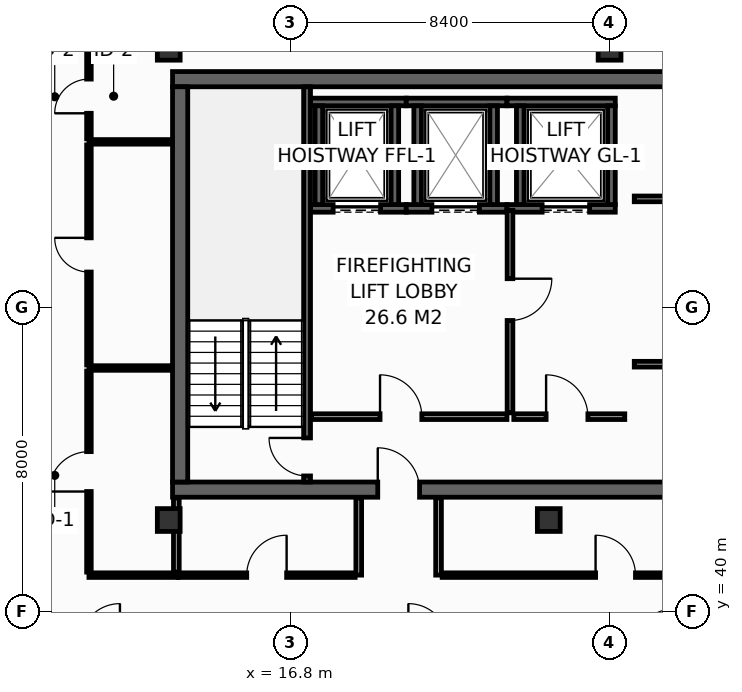
"""IFC4 building model, lengths in metres.
Left out: names, types, materials, properties, quantities, classifications, styles, units other than length and angle.
Written with IfcOpenShell. Run it as: python <this file> out.ifc"""

import sys

from ifc_helpers import new_model, si_unit, direction, frame, frame_2d, origin, origin_2d, place, context, subcontext, project, spatial, rectangle, hollow_rectangle, extrude, element, fill, save


model = new_model("IFC4")
c1 = context("Model", 3, precision=1e-05, world=origin(), true_north=direction((0.0, 1.0)))
c2 = subcontext(c1, "Body", "Model", "MODEL_VIEW")
j1 = project(units=[si_unit("LENGTHUNIT", "METRE"), si_unit("PLANEANGLEUNIT", "RADIAN")], contexts=[c1])
p1 = place(None, origin())
s1 = spatial("IfcSite", under=j1, at=p1, CompositionType="ELEMENT")
p2 = place(p1, origin())
s2 = spatial("IfcBuilding", under=s1, at=p2, CompositionType="ELEMENT")
p3 = place(p2, frame((0.0, 0.0, 276.2)))
s3 = spatial("IfcBuildingStorey", under=s2, at=p3, CompositionType="ELEMENT", Elevation=276.2)
p4 = place(p3, frame((13.7, 43.2, 0.0), z_axis=(0.0, 0.0, 1.0), x_axis=(1.0, 0.0, 0.0)))
e1 = element("IfcWall", 1, at=p4, inside=s3, PredefinedType="SHEAR", context=c2, shape_type="SweptSolid", body=[
    extrude(rectangle(XDim=32.5, YDim=0.4, at=frame_2d((16.25, 0.0))), origin(), (0.0, 0.0, 1.0), 3.55),
])
p5 = place(p4, frame((5.4, 0.0, 0.0)))
e2 = element("IfcOpeningElement", 2, at=p5, cuts=e1, PredefinedType="OPENING", context=c2, shape_type="SweptSolid", body=[
    extrude(rectangle(XDim=1.1, YDim=2.15, at=frame_2d((0.55, 1.075))), frame((0.0, 0.21, 0.0), z_axis=(0.0, -1.0, 0.0), x_axis=(1.0, 0.0, 0.0)), (0.0, 0.0, 1.0), 0.42),
])
p6 = place(p4, frame((25.6, 0.0, 0.0)))
e3 = element("IfcOpeningElement", 3, at=p6, cuts=e1, PredefinedType="OPENING", context=c2, shape_type="SweptSolid", body=[
    extrude(rectangle(XDim=1.1, YDim=2.15, at=frame_2d((0.55, 1.075))), frame((0.0, 0.21, 0.0), z_axis=(0.0, -1.0, 0.0), x_axis=(1.0, 0.0, 0.0)), (0.0, 0.0, 1.0), 0.42),
])
p7 = place(p3, frame((13.7, 54.0, 0.0), z_axis=(0.0, 0.0, 1.0), x_axis=(1.0, 0.0, 0.0)))
e4 = element("IfcWall", 4, at=p7, inside=s3, PredefinedType="SHEAR", context=c2, shape_type="SweptSolid", body=[
    extrude(rectangle(XDim=32.5, YDim=0.4, at=frame_2d((16.25, 0.0))), origin(), (0.0, 0.0, 1.0), 3.55),
])
p8 = place(p3, frame((13.9, 43.4, 0.0), z_axis=(0.0, 0.0, 1.0), x_axis=(0.0, 1.0, 0.0)))
e5 = element("IfcWall", 5, at=p8, inside=s3, PredefinedType="SHEAR", context=c2, shape_type="SweptSolid", body=[
    extrude(rectangle(XDim=10.4, YDim=0.4, at=frame_2d((5.2, 0.0))), origin(), (0.0, 0.0, 1.0), 3.55),
])
for number, where, z_axis, x_axis in (
    (6, (13.6, 54.8, 0.0), (0.0, 0.0, 1.0), (1.0, 0.0, 0.0)),
    (7, (25.2, 54.8, 0.0), (0.0, 0.0, 1.0), (1.0, 0.0, 0.0)),
    (8, (13.6, 42.4, 0.0), (0.0, 0.0, 1.0), (1.0, 0.0, 0.0)),
    (9, (23.6, 42.4, 0.0), (0.0, 0.0, 1.0), (1.0, 0.0, 0.0)),
):
    element("IfcColumn", number, at=place(p3, frame(where, z_axis=z_axis, x_axis=x_axis)), inside=s3, PredefinedType="COLUMN", context=c2, shape_type="SweptSolid", body=[
        extrude(hollow_rectangle(XDim=0.6, YDim=0.6, WallThickness=0.028, at=origin_2d()), origin(), (0.0, 0.0, 1.0), 3.8),
    ])
p9 = place(p3, frame((17.33, 50.6, 0.0), z_axis=(0.0, 0.0, 1.0), x_axis=(1.0, 0.0, 0.0)))
e10 = element("IfcWall", 10, at=p9, inside=s3, PredefinedType="SHEAR", context=c2, shape_type="SweptSolid", body=[
    extrude(rectangle(XDim=2.52, YDim=0.2, at=frame_2d((1.26, 0.0))), origin(), (0.0, 0.0, 1.0), 3.55),
])
p10 = place(p9, frame((0.595, 0.0, 0.0)))
e11 = element("IfcOpeningElement", 11, at=p10, cuts=e10, PredefinedType="OPENING", context=c2, shape_type="SweptSolid", body=[
    extrude(rectangle(XDim=1.25, YDim=2.3, at=frame_2d((0.625, 1.15))), frame((0.0, 0.11, 0.0), z_axis=(0.0, -1.0, 0.0), x_axis=(1.0, 0.0, 0.0)), (0.0, 0.0, 1.0), 0.22),
])
p11 = place(p3, frame((17.33, 53.4, 0.0), z_axis=(0.0, 0.0, 1.0), x_axis=(1.0, 0.0, 0.0)))
e12 = element("IfcWall", 12, at=p11, inside=s3, PredefinedType="SHEAR", context=c2, shape_type="SweptSolid", body=[
    extrude(rectangle(XDim=2.52, YDim=0.2, at=frame_2d((1.26, 0.0))), origin(), (0.0, 0.0, 1.0), 3.55),
])
for number, where, z_axis, x_axis in (
    (13, (17.55, 50.7, 0.0), (0.0, 0.0, 1.0), (0.0, 1.0, 0.0)),
    (14, (19.55, 50.7, 0.0), (0.0, 0.0, 1.0), (0.0, 1.0, 0.0)),
):
    element("IfcWall", number, at=place(p3, frame(where, z_axis=z_axis, x_axis=x_axis)), inside=s3, PredefinedType="SHEAR", context=c2, shape_type="SweptSolid", body=[
        extrude(rectangle(XDim=2.6, YDim=0.2, at=frame_2d((1.3, 0.0))), origin(), (0.0, 0.0, 1.0), 3.55),
    ])
p12 = place(p3, frame((19.85, 50.6, 0.0), z_axis=(0.0, 0.0, 1.0), x_axis=(1.0, 0.0, 0.0)))
e15 = element("IfcWall", 15, at=p12, inside=s3, PredefinedType="SHEAR", context=c2, shape_type="SweptSolid", body=[
    extrude(rectangle(XDim=2.65, YDim=0.2, at=frame_2d((1.325, 0.0))), origin(), (0.0, 0.0, 1.0), 3.55),
])
p13 = place(p12, frame((0.675, 0.0, 0.0)))
e16 = element("IfcOpeningElement", 16, at=p13, cuts=e15, PredefinedType="OPENING", context=c2, shape_type="SweptSolid", body=[
    extrude(rectangle(XDim=1.25, YDim=2.3, at=frame_2d((0.625, 1.15))), frame((0.0, 0.11, 0.0), z_axis=(0.0, -1.0, 0.0), x_axis=(1.0, 0.0, 0.0)), (0.0, 0.0, 1.0), 0.22),
])
p14 = place(p3, frame((19.85, 53.4, 0.0), z_axis=(0.0, 0.0, 1.0), x_axis=(1.0, 0.0, 0.0)))
e17 = element("IfcWall", 17, at=p14, inside=s3, PredefinedType="SHEAR", context=c2, shape_type="SweptSolid", body=[
    extrude(rectangle(XDim=2.65, YDim=0.2, at=frame_2d((1.325, 0.0))), origin(), (0.0, 0.0, 1.0), 3.55),
])
for number, where, z_axis, x_axis in (
    (18, (20.15, 50.7, 0.0), (0.0, 0.0, 1.0), (0.0, 1.0, 0.0)),
    (19, (22.15, 50.7, 0.0), (0.0, 0.0, 1.0), (0.0, 1.0, 0.0)),
):
    element("IfcWall", number, at=place(p3, frame(where, z_axis=z_axis, x_axis=x_axis)), inside=s3, PredefinedType="SHEAR", context=c2, shape_type="SweptSolid", body=[
        extrude(rectangle(XDim=2.6, YDim=0.2, at=frame_2d((1.3, 0.0))), origin(), (0.0, 0.0, 1.0), 3.55),
    ])
p15 = place(p3, frame((22.5, 50.6, 0.0), z_axis=(0.0, 0.0, 1.0), x_axis=(1.0, 0.0, 0.0)))
e20 = element("IfcWall", 20, at=p15, inside=s3, PredefinedType="SHEAR", context=c2, shape_type="SweptSolid", body=[
    extrude(rectangle(XDim=2.85, YDim=0.2, at=frame_2d((1.425, 0.0))), origin(), (0.0, 0.0, 1.0), 3.55),
])
p16 = place(p15, frame((0.925, 0.0, 0.0)))
e21 = element("IfcOpeningElement", 21, at=p16, cuts=e20, PredefinedType="OPENING", context=c2, shape_type="SweptSolid", body=[
    extrude(rectangle(XDim=1.25, YDim=2.3, at=frame_2d((0.625, 1.15))), frame((0.0, 0.11, 0.0), z_axis=(0.0, -1.0, 0.0), x_axis=(1.0, 0.0, 0.0)), (0.0, 0.0, 1.0), 0.22),
])
p17 = place(p3, frame((22.5, 53.4, 0.0), z_axis=(0.0, 0.0, 1.0), x_axis=(1.0, 0.0, 0.0)))
e22 = element("IfcWall", 22, at=p17, inside=s3, PredefinedType="SHEAR", context=c2, shape_type="SweptSolid", body=[
    extrude(rectangle(XDim=2.85, YDim=0.2, at=frame_2d((1.425, 0.0))), origin(), (0.0, 0.0, 1.0), 3.55),
])
for number, where, z_axis, x_axis in (
    (23, (22.85, 50.7, 0.0), (0.0, 0.0, 1.0), (0.0, 1.0, 0.0)),
    (24, (25.25, 50.7, 0.0), (0.0, 0.0, 1.0), (0.0, 1.0, 0.0)),
):
    element("IfcWall", number, at=place(p3, frame(where, z_axis=z_axis, x_axis=x_axis)), inside=s3, PredefinedType="SHEAR", context=c2, shape_type="SweptSolid", body=[
        extrude(rectangle(XDim=2.6, YDim=0.2, at=frame_2d((1.3, 0.0))), origin(), (0.0, 0.0, 1.0), 3.55),
    ])
p18 = place(p3, frame((17.24, 43.4, 0.0), z_axis=(0.0, 0.0, 1.0), x_axis=(0.0, 1.0, 0.0)))
e25 = element("IfcWall", 25, at=p18, inside=s3, PredefinedType="SHEAR", context=c2, shape_type="SweptSolid", body=[
    extrude(rectangle(XDim=10.4, YDim=0.18, at=frame_2d((5.2, 0.0))), origin(), (0.0, 0.0, 1.0), 3.55),
])
p19 = place(p18, frame((0.16, 0.0, 0.0)))
e26 = element("IfcOpeningElement", 26, at=p19, cuts=e25, PredefinedType="OPENING", context=c2, shape_type="SweptSolid", body=[
    extrude(rectangle(XDim=1.0, YDim=2.15, at=frame_2d((0.5, 1.075))), frame((0.0, 0.1, 0.0), z_axis=(0.0, -1.0, 0.0), x_axis=(1.0, 0.0, 0.0)), (0.0, 0.0, 1.0), 0.2),
])
p20 = place(p3, frame((17.36, 45.12, 0.0), z_axis=(0.0, 0.0, 1.0), x_axis=(1.0, 0.0, 0.0)))
e27 = element("IfcWall", 27, at=p20, inside=s3, PredefinedType="PARTITIONING", context=c2, shape_type="SweptSolid", body=[
    extrude(rectangle(XDim=5.14, YDim=0.15, at=frame_2d((2.57, 0.0))), origin(), (0.0, 0.0, 1.0), 3.55),
])
p21 = place(p20, frame((1.8, 0.0, 0.0)))
e28 = element("IfcOpeningElement", 28, at=p21, cuts=e27, PredefinedType="OPENING", context=c2, shape_type="SweptSolid", body=[
    extrude(rectangle(XDim=1.1, YDim=2.15, at=frame_2d((0.55, 1.075))), frame((0.0, 0.085, 0.0), z_axis=(0.0, -1.0, 0.0), x_axis=(1.0, 0.0, 0.0)), (0.0, 0.0, 1.0), 0.17),
])
p22 = place(p3, frame((22.58, 50.55, 0.0), z_axis=(0.0, 0.0, 1.0), x_axis=(0.0, -1.0, 0.0)))
e29 = element("IfcWall", 29, at=p22, inside=s3, PredefinedType="PARTITIONING", context=c2, shape_type="SweptSolid", body=[
    extrude(rectangle(XDim=5.33, YDim=0.15, at=frame_2d((2.665, 0.0))), origin(), (0.0, 0.0, 1.0), 3.55),
])
p23 = place(p22, frame((1.8, 0.0, 0.0)))
e30 = element("IfcOpeningElement", 30, at=p23, cuts=e29, PredefinedType="OPENING", context=c2, shape_type="SweptSolid", body=[
    extrude(rectangle(XDim=1.1, YDim=2.15, at=frame_2d((0.55, 1.075))), frame((0.0, 0.085, 0.0), z_axis=(0.0, -1.0, 0.0), x_axis=(1.0, 0.0, 0.0)), (0.0, 0.0, 1.0), 0.17),
])
p24 = place(p3, frame((22.68, 45.12, 0.0), z_axis=(0.0, 0.0, 1.0), x_axis=(1.0, 0.0, 0.0)))
e31 = element("IfcWall", 31, at=p24, inside=s3, PredefinedType="PARTITIONING", context=c2, shape_type="SweptSolid", body=[
    extrude(rectangle(XDim=2.92, YDim=0.15, at=frame_2d((1.46, 0.0))), origin(), (0.0, 0.0, 1.0), 3.55),
])
p25 = place(p24, frame((0.85, 0.0, 0.0)))
e32 = element("IfcOpeningElement", 32, at=p25, cuts=e31, PredefinedType="OPENING", context=c2, shape_type="SweptSolid", body=[
    extrude(rectangle(XDim=1.1, YDim=2.15, at=frame_2d((0.55, 1.075))), frame((0.0, 0.085, 0.0), z_axis=(0.0, -1.0, 0.0), x_axis=(1.0, 0.0, 0.0)), (0.0, 0.0, 1.0), 0.17),
])
p26 = place(p3, frame((25.85, 50.85, 0.0), z_axis=(0.0, 0.0, 1.0), x_axis=(1.0, 0.0, 0.0)))
e33 = element("IfcWall", 33, at=p26, inside=s3, PredefinedType="PARTITIONING", context=c2, shape_type="SweptSolid", body=[
    extrude(rectangle(XDim=7.65, YDim=0.15, at=frame_2d((3.825, 0.0))), origin(), (0.0, 0.0, 1.0), 3.55),
])
p27 = place(p26, frame((1.25, 0.0, 0.0)))
e34 = element("IfcOpeningElement", 34, at=p27, cuts=e33, PredefinedType="OPENING", context=c2, shape_type="SweptSolid", body=[
    extrude(rectangle(XDim=0.95, YDim=2.15, at=frame_2d((0.475, 1.075))), frame((0.0, 0.085, 0.0), z_axis=(0.0, -1.0, 0.0), x_axis=(1.0, 0.0, 0.0)), (0.0, 0.0, 1.0), 0.17),
])
p28 = place(p26, frame((5.05, 0.0, 0.0)))
e35 = element("IfcOpeningElement", 35, at=p28, cuts=e33, PredefinedType="OPENING", context=c2, shape_type="SweptSolid", body=[
    extrude(rectangle(XDim=0.95, YDim=2.15, at=frame_2d((0.475, 1.075))), frame((0.0, 0.085, 0.0), z_axis=(0.0, -1.0, 0.0), x_axis=(1.0, 0.0, 0.0)), (0.0, 0.0, 1.0), 0.17),
])
p29 = place(p3, frame((25.85, 46.5, 0.0), z_axis=(0.0, 0.0, 1.0), x_axis=(1.0, 0.0, 0.0)))
e36 = element("IfcWall", 36, at=p29, inside=s3, PredefinedType="PARTITIONING", context=c2, shape_type="SweptSolid", body=[
    extrude(rectangle(XDim=7.65, YDim=0.15, at=frame_2d((3.825, 0.0))), origin(), (0.0, 0.0, 1.0), 3.55),
])
p30 = place(p29, frame((2.8, 0.0, 0.0)))
e37 = element("IfcOpeningElement", 37, at=p30, cuts=e36, PredefinedType="OPENING", context=c2, shape_type="SweptSolid", body=[
    extrude(rectangle(XDim=0.95, YDim=2.15, at=frame_2d((0.475, 1.075))), frame((0.0, 0.085, 0.0), z_axis=(0.0, -1.0, 0.0), x_axis=(1.0, 0.0, 0.0)), (0.0, 0.0, 1.0), 0.17),
])
p31 = place(p3, frame((11.5, 40.95, 0.0), z_axis=(0.0, 0.0, 1.0), x_axis=(1.0, 0.0, 0.0)))
e38 = element("IfcWall", 38, at=p31, inside=s3, PredefinedType="PARTITIONING", context=c2, shape_type="SweptSolid", body=[
    extrude(rectangle(XDim=2.35, YDim=0.12, at=frame_2d((1.175, 0.0))), origin(), (0.0, 0.0, 1.0), 3.55),
])
p32 = place(p3, frame((11.5, 52.35, 0.0), z_axis=(0.0, 0.0, 1.0), x_axis=(1.0, 0.0, 0.0)))
e39 = element("IfcWall", 39, at=p32, inside=s3, PredefinedType="PARTITIONING", context=c2, shape_type="SweptSolid", body=[
    extrude(rectangle(XDim=2.18, YDim=0.12, at=frame_2d((1.09, 0.0))), origin(), (0.0, 0.0, 1.0), 3.55),
])
p33 = place(p3, frame((11.5, 52.43, 0.0), z_axis=(0.0, 0.0, 1.0), x_axis=(0.0, 1.0, 0.0)))
e40 = element("IfcWall", 40, at=p33, inside=s3, PredefinedType="PARTITIONING", context=c2, shape_type="SweptSolid", body=[
    extrude(rectangle(XDim=3.565, YDim=0.12, at=frame_2d((1.783, 0.0))), origin(), (0.0, 0.0, 1.0), 2.935),
])
p34 = place(p33, frame((0.672, 0.0, 0.0)))
e41 = element("IfcOpeningElement", 41, at=p34, cuts=e40, PredefinedType="OPENING", context=c2, shape_type="SweptSolid", body=[
    extrude(rectangle(XDim=0.9, YDim=2.1, at=frame_2d((0.45, 1.05))), frame((0.0, 0.07, 0.0), z_axis=(0.0, -1.0, 0.0), x_axis=(1.0, 0.0, 0.0)), (0.0, 0.0, 1.0), 0.14),
])
p35 = place(p3, frame((11.5, 46.4, 0.0), z_axis=(0.0, 0.0, 1.0), x_axis=(1.0, 0.0, 0.0)))
e42 = element("IfcWall", 42, at=p35, inside=s3, PredefinedType="PARTITIONING", context=c2, shape_type="SweptSolid", body=[
    extrude(rectangle(XDim=2.18, YDim=0.12, at=frame_2d((1.09, 0.0))), origin(), (0.0, 0.0, 1.0), 3.55),
])
p36 = place(p3, frame((11.5, 41.03, 0.0), z_axis=(0.0, 0.0, 1.0), x_axis=(0.0, 1.0, 0.0)))
e43 = element("IfcWall", 43, at=p36, inside=s3, PredefinedType="PARTITIONING", context=c2, shape_type="SweptSolid", body=[
    extrude(rectangle(XDim=5.29, YDim=0.12, at=frame_2d((2.645, 0.0))), origin(), (0.0, 0.0, 1.0), 2.947),
])
p37 = place(p36, frame((2.12, 0.0, 0.0)))
e44 = element("IfcOpeningElement", 44, at=p37, cuts=e43, PredefinedType="OPENING", context=c2, shape_type="SweptSolid", body=[
    extrude(rectangle(XDim=1.05, YDim=2.15, at=frame_2d((0.525, 1.075))), frame((0.0, 0.07, 0.0), z_axis=(0.0, -1.0, 0.0), x_axis=(1.0, 0.0, 0.0)), (0.0, 0.0, 1.0), 0.14),
])
p38 = place(p3, frame((11.5, 46.48, 0.0), z_axis=(0.0, 0.0, 1.0), x_axis=(0.0, 1.0, 0.0)))
e45 = element("IfcWall", 45, at=p38, inside=s3, PredefinedType="PARTITIONING", context=c2, shape_type="SweptSolid", body=[
    extrude(rectangle(XDim=5.79, YDim=0.12, at=frame_2d((2.895, 0.0))), origin(), (0.0, 0.0, 1.0), 3.55),
])
p39 = place(p38, frame((2.445, 0.0, 0.0)))
e46 = element("IfcOpeningElement", 46, at=p39, cuts=e45, PredefinedType="OPENING", context=c2, shape_type="SweptSolid", body=[
    extrude(rectangle(XDim=0.9, YDim=2.1, at=frame_2d((0.45, 1.05))), frame((0.0, 0.07, 0.0), z_axis=(0.0, -1.0, 0.0), x_axis=(1.0, 0.0, 0.0)), (0.0, 0.0, 1.0), 0.14),
])
p40 = place(p3, frame((13.8, 41.03, 0.0), z_axis=(0.0, 0.0, 1.0), x_axis=(0.0, 1.0, 0.0)))
e47 = element("IfcWall", 47, at=p40, inside=s3, PredefinedType="PARTITIONING", context=c2, shape_type="SweptSolid", body=[
    extrude(rectangle(XDim=1.95, YDim=0.15, at=frame_2d((0.975, 0.0))), origin(), (0.0, 0.0, 1.0), 3.55),
])
for number, where, z_axis, x_axis in (
    (48, (18.6, 40.95, 0.0), (0.0, 0.0, 1.0), (0.0, 1.0, 0.0)),
    (49, (20.7, 40.95, 0.0), (0.0, 0.0, 1.0), (0.0, 1.0, 0.0)),
):
    element("IfcWall", number, at=place(p3, frame(where, z_axis=z_axis, x_axis=x_axis)), inside=s3, PredefinedType="PARTITIONING", context=c2, shape_type="SweptSolid", body=[
        extrude(rectangle(XDim=2.03, YDim=0.15, at=frame_2d((1.015, 0.0))), origin(), (0.0, 0.0, 1.0), 3.55),
    ])
p41 = place(p3, frame((13.85, 40.95, 0.0), z_axis=(0.0, 0.0, 1.0), x_axis=(1.0, 0.0, 0.0)))
e50 = element("IfcWall", 50, at=p41, inside=s3, PredefinedType="PARTITIONING", context=c2, shape_type="SweptSolid", body=[
    extrude(rectangle(XDim=4.655, YDim=0.12, at=frame_2d((2.327, 0.0))), origin(), (0.0, 0.0, 1.0), 3.55),
])
p42 = place(p41, frame((1.802, 0.0, 0.0)))
e51 = element("IfcOpeningElement", 51, at=p42, cuts=e50, PredefinedType="OPENING", context=c2, shape_type="SweptSolid", body=[
    extrude(rectangle(XDim=1.05, YDim=2.15, at=frame_2d((0.525, 1.075))), frame((0.0, 0.07, 0.0), z_axis=(0.0, -1.0, 0.0), x_axis=(1.0, 0.0, 0.0)), (0.0, 0.0, 1.0), 0.14),
])
p43 = place(p3, frame((20.795, 40.95, 0.0), z_axis=(0.0, 0.0, 1.0), x_axis=(1.0, 0.0, 0.0)))
e52 = element("IfcWall", 52, at=p43, inside=s3, PredefinedType="PARTITIONING", context=c2, shape_type="SweptSolid", body=[
    extrude(rectangle(XDim=9.125, YDim=0.12, at=frame_2d((4.562, 0.0))), origin(), (0.0, 0.0, 1.0), 2.947),
])
p44 = place(p43, frame((4.037, 0.0, 0.0)))
e53 = element("IfcOpeningElement", 53, at=p44, cuts=e52, PredefinedType="OPENING", context=c2, shape_type="SweptSolid", body=[
    extrude(rectangle(XDim=1.05, YDim=2.15, at=frame_2d((0.525, 1.075))), frame((0.0, 0.07, 0.0), z_axis=(0.0, -1.0, 0.0), x_axis=(1.0, 0.0, 0.0)), (0.0, 0.0, 1.0), 0.14),
])
p45 = place(p10, origin())
e54 = element("IfcDoor", 54, at=p45, inside=s3, OperationType="SLIDING_TO_LEFT", PredefinedType="DOOR", context=c2, shape_type="SweptSolid", body=[
    extrude(rectangle(XDim=1.25, YDim=2.3, at=frame_2d((0.625, 1.15))), frame((0.0, 0.025, 0.0), z_axis=(0.0, -1.0, 0.0), x_axis=(1.0, 0.0, 0.0)), (0.0, 0.0, 1.0), 0.05),
])
fill(e11, e54)
p46 = place(p13, origin())
e55 = element("IfcDoor", 55, at=p46, inside=s3, OperationType="SLIDING_TO_LEFT", PredefinedType="DOOR", context=c2, shape_type="SweptSolid", body=[
    extrude(rectangle(XDim=1.25, YDim=2.3, at=frame_2d((0.625, 1.15))), frame((0.0, 0.025, 0.0), z_axis=(0.0, -1.0, 0.0), x_axis=(1.0, 0.0, 0.0)), (0.0, 0.0, 1.0), 0.05),
])
fill(e16, e55)
p47 = place(p16, origin())
e56 = element("IfcDoor", 56, at=p47, inside=s3, OperationType="SLIDING_TO_LEFT", PredefinedType="DOOR", context=c2, shape_type="SweptSolid", body=[
    extrude(rectangle(XDim=1.25, YDim=2.3, at=frame_2d((0.625, 1.15))), frame((0.0, 0.025, 0.0), z_axis=(0.0, -1.0, 0.0), x_axis=(1.0, 0.0, 0.0)), (0.0, 0.0, 1.0), 0.05),
])
fill(e21, e56)
p48 = place(p19, origin())
e57 = element("IfcDoor", 57, at=p48, inside=s3, OperationType="SINGLE_SWING_RIGHT", PredefinedType="DOOR", context=c2, shape_type="SweptSolid", body=[
    extrude(rectangle(XDim=1.0, YDim=2.15, at=frame_2d((0.5, 1.075))), frame((0.0, 0.025, 0.0), z_axis=(0.0, -1.0, 0.0), x_axis=(1.0, 0.0, 0.0)), (0.0, 0.0, 1.0), 0.05),
])
fill(e26, e57)
p49 = place(p21, origin())
e58 = element("IfcDoor", 58, at=p49, inside=s3, OperationType="SINGLE_SWING_LEFT", PredefinedType="DOOR", context=c2, shape_type="SweptSolid", body=[
    extrude(rectangle(XDim=1.1, YDim=2.15, at=frame_2d((0.55, 1.075))), frame((0.0, 0.025, 0.0), z_axis=(0.0, -1.0, 0.0), x_axis=(1.0, 0.0, 0.0)), (0.0, 0.0, 1.0), 0.05),
])
fill(e28, e58)
p50 = place(p23, origin())
e59 = element("IfcDoor", 59, at=p50, inside=s3, OperationType="SINGLE_SWING_LEFT", PredefinedType="DOOR", context=c2, shape_type="SweptSolid", body=[
    extrude(rectangle(XDim=1.1, YDim=2.15, at=frame_2d((0.55, 1.075))), frame((0.0, 0.025, 0.0), z_axis=(0.0, -1.0, 0.0), x_axis=(1.0, 0.0, 0.0)), (0.0, 0.0, 1.0), 0.05),
])
fill(e30, e59)
p51 = place(p25, origin())
e60 = element("IfcDoor", 60, at=p51, inside=s3, OperationType="SINGLE_SWING_LEFT", PredefinedType="DOOR", context=c2, shape_type="SweptSolid", body=[
    extrude(rectangle(XDim=1.1, YDim=2.15, at=frame_2d((0.55, 1.075))), frame((0.0, 0.025, 0.0), z_axis=(0.0, -1.0, 0.0), x_axis=(1.0, 0.0, 0.0)), (0.0, 0.0, 1.0), 0.05),
])
fill(e32, e60)
p52 = place(p5, origin())
e61 = element("IfcDoor", 61, at=p52, inside=s3, OperationType="SINGLE_SWING_LEFT", PredefinedType="DOOR", context=c2, shape_type="SweptSolid", body=[
    extrude(rectangle(XDim=1.1, YDim=2.15, at=frame_2d((0.55, 1.075))), frame((0.0, 0.025, 0.0), z_axis=(0.0, -1.0, 0.0), x_axis=(1.0, 0.0, 0.0)), (0.0, 0.0, 1.0), 0.05),
])
fill(e2, e61)
p53 = place(p34, origin())
e62 = element("IfcDoor", 62, at=p53, inside=s3, OperationType="SINGLE_SWING_LEFT", PredefinedType="DOOR", context=c2, shape_type="SweptSolid", body=[
    extrude(rectangle(XDim=0.9, YDim=2.1, at=frame_2d((0.45, 1.05))), frame((0.0, 0.025, 0.0), z_axis=(0.0, -1.0, 0.0), x_axis=(1.0, 0.0, 0.0)), (0.0, 0.0, 1.0), 0.05),
])
fill(e41, e62)
p54 = place(p37, origin())
e63 = element("IfcDoor", 63, at=p54, inside=s3, OperationType="SINGLE_SWING_LEFT", PredefinedType="DOOR", context=c2, shape_type="SweptSolid", body=[
    extrude(rectangle(XDim=1.05, YDim=2.15, at=frame_2d((0.525, 1.075))), frame((0.0, 0.025, 0.0), z_axis=(0.0, -1.0, 0.0), x_axis=(1.0, 0.0, 0.0)), (0.0, 0.0, 1.0), 0.05),
])
fill(e44, e63)
p55 = place(p39, origin())
e64 = element("IfcDoor", 64, at=p55, inside=s3, OperationType="SINGLE_SWING_RIGHT", PredefinedType="DOOR", context=c2, shape_type="SweptSolid", body=[
    extrude(rectangle(XDim=0.9, YDim=2.1, at=frame_2d((0.45, 1.05))), frame((0.0, 0.025, 0.0), z_axis=(0.0, -1.0, 0.0), x_axis=(1.0, 0.0, 0.0)), (0.0, 0.0, 1.0), 0.05),
])
fill(e46, e64)
p56 = place(p42, origin())
e65 = element("IfcDoor", 65, at=p56, inside=s3, OperationType="SINGLE_SWING_RIGHT", PredefinedType="DOOR", context=c2, shape_type="SweptSolid", body=[
    extrude(rectangle(XDim=1.05, YDim=2.15, at=frame_2d((0.525, 1.075))), frame((0.0, 0.025, 0.0), z_axis=(0.0, -1.0, 0.0), x_axis=(1.0, 0.0, 0.0)), (0.0, 0.0, 1.0), 0.05),
])
fill(e51, e65)
p57 = place(p44, origin())
e66 = element("IfcDoor", 66, at=p57, inside=s3, OperationType="SINGLE_SWING_LEFT", PredefinedType="DOOR", context=c2, shape_type="SweptSolid", body=[
    extrude(rectangle(XDim=1.05, YDim=2.15, at=frame_2d((0.525, 1.075))), frame((0.0, 0.025, 0.0), z_axis=(0.0, -1.0, 0.0), x_axis=(1.0, 0.0, 0.0)), (0.0, 0.0, 1.0), 0.05),
])
fill(e53, e66)
save(model, sys.argv[1])
